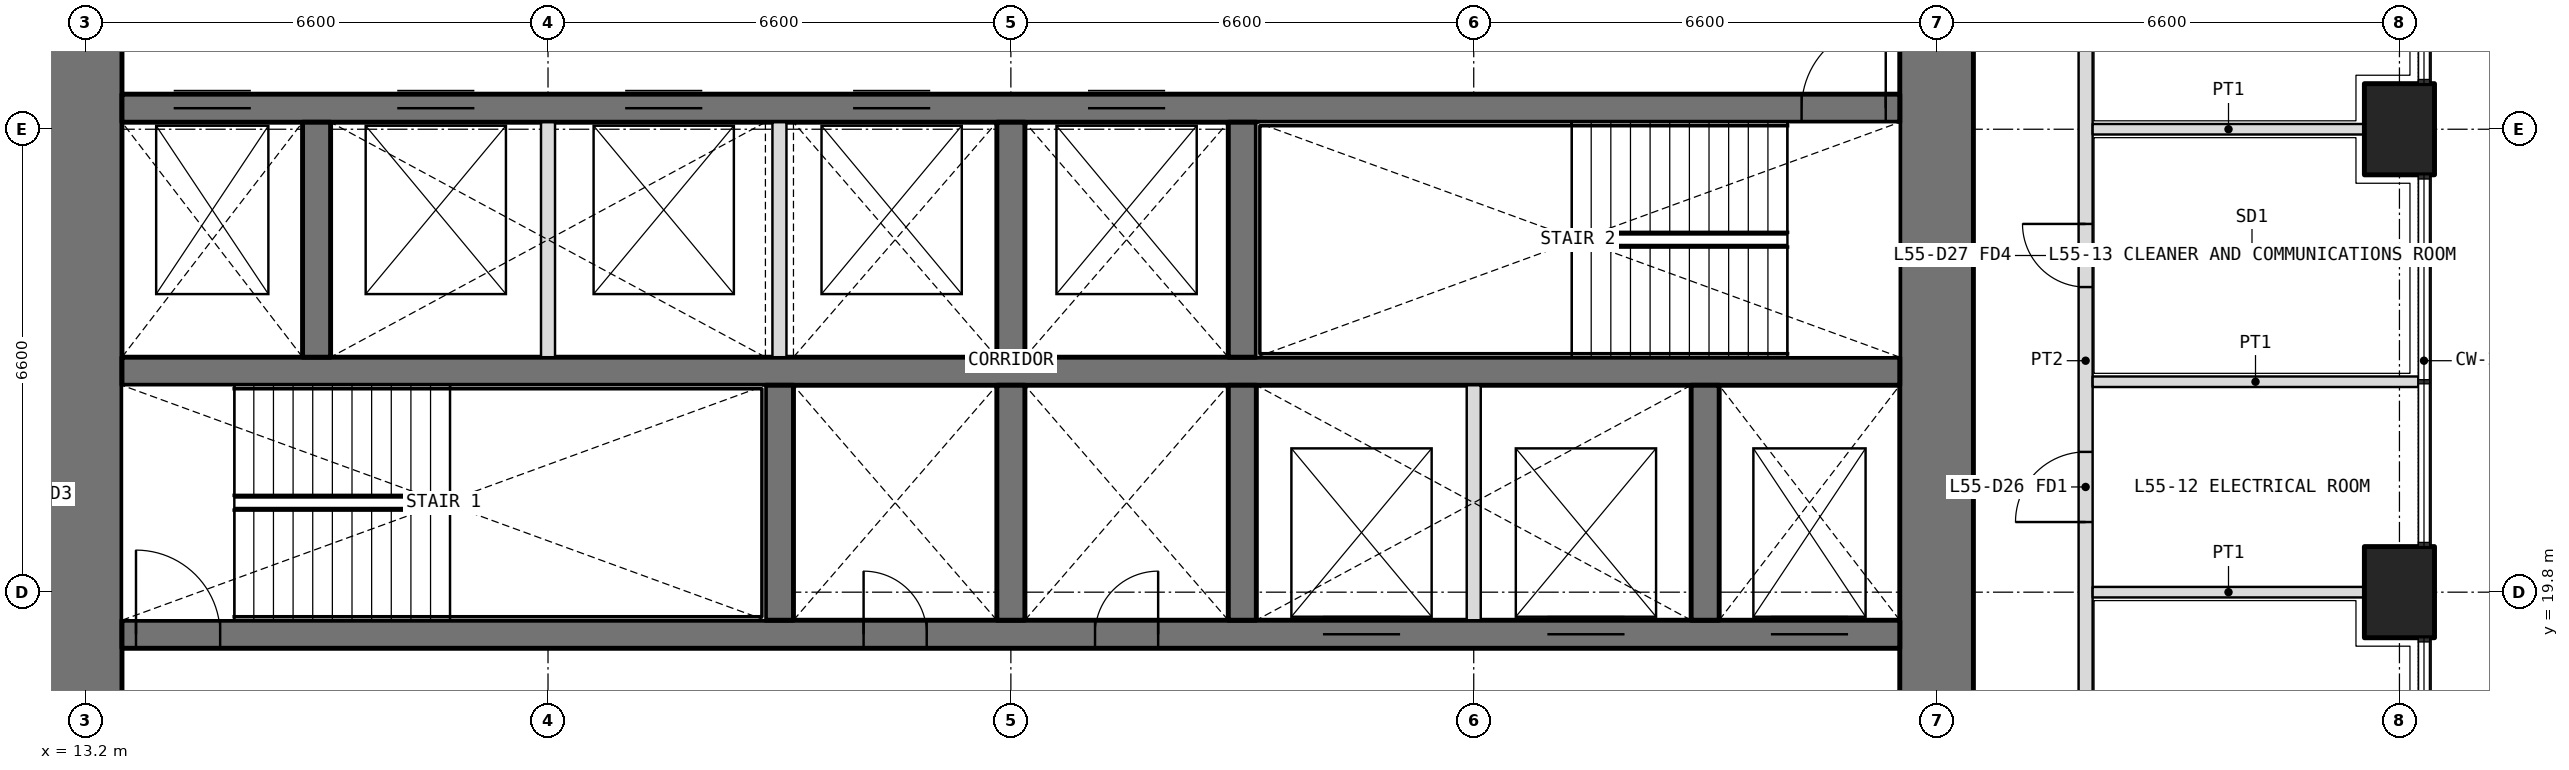
"""IFC4 building model, lengths in metres.
Left out: names, types, materials, properties, quantities, classifications, styles, units other than length and angle.
Written with IfcOpenShell. Run it as: python <this file> out.ifc"""

import sys

from ifc_helpers import new_model, si_unit, direction, frame, frame_2d, origin, origin_2d, place, context, subcontext, project, spatial, rectangle, extrude, element, fill, save


model = new_model("IFC4")
c1 = context("Model", 3, precision=1e-05, world=origin(), true_north=direction((0.0, 1.0)))
c2 = subcontext(c1, "Body", "Model", "MODEL_VIEW")
j1 = project(units=[si_unit("LENGTHUNIT", "METRE"), si_unit("PLANEANGLEUNIT", "RADIAN")], contexts=[c1])
p1 = place(None, origin())
s1 = spatial("IfcSite", under=j1, at=p1, CompositionType="ELEMENT")
p2 = place(p1, origin())
s2 = spatial("IfcBuilding", under=s1, at=p2, CompositionType="ELEMENT")
p3 = place(p2, frame((0.0, 0.0, 241.8)))
s3 = spatial("IfcBuildingStorey", under=s2, at=p3, CompositionType="ELEMENT", Elevation=241.8)
for number, where, z_axis, x_axis in (
    (1, (46.2, 19.8, 0.0), (0.0, 0.0, 1.0), (0.0, 1.0, 0.0)),
    (2, (46.2, 26.4, 0.0), (0.0, 0.0, 1.0), (0.0, 1.0, 0.0)),
):
    element("IfcColumn", number, at=place(p3, frame(where, z_axis=z_axis, x_axis=x_axis)), inside=s3, PredefinedType="COLUMN", context=c2, shape_type="SweptSolid", body=[
        extrude(rectangle(XDim=1.3, YDim=1.0, at=origin_2d()), origin(), (0.0, 0.0, 1.0), 4.2),
    ])
p4 = place(p3, frame((39.6, 13.725, 0.0), z_axis=(0.0, 0.0, 1.0), x_axis=(0.0, 1.0, 0.0)))
e3 = element("IfcWall", 3, at=p4, inside=s3, PredefinedType="SHEAR", context=c2, shape_type="SweptSolid", body=[
    extrude(rectangle(XDim=18.75, YDim=1.05, at=frame_2d((9.375, 0.0))), origin(), (0.0, 0.0, 1.0), 4.2),
])
p5 = place(p4, frame((3.025, 0.0, 0.0)))
e4 = element("IfcOpeningElement", 4, at=p5, cuts=e3, PredefinedType="OPENING", context=c2, shape_type="SweptSolid", body=[
    extrude(rectangle(XDim=1.6, YDim=2.1, at=frame_2d((0.8, 1.05))), frame((0.0, 0.535, 0.0), z_axis=(0.0, -1.0, 0.0), x_axis=(1.0, 0.0, 0.0)), (0.0, 0.0, 1.0), 1.07),
])
p6 = place(p4, frame((13.825, 0.0, 0.0)))
e5 = element("IfcOpeningElement", 5, at=p6, cuts=e3, PredefinedType="OPENING", context=c2, shape_type="SweptSolid", body=[
    extrude(rectangle(XDim=1.6, YDim=2.1, at=frame_2d((0.8, 1.05))), frame((0.0, 0.535, 0.0), z_axis=(0.0, -1.0, 0.0), x_axis=(1.0, 0.0, 0.0)), (0.0, 0.0, 1.0), 1.07),
])
p7 = place(p3, frame((13.2, 32.475, 0.0), z_axis=(0.0, 0.0, 1.0), x_axis=(0.0, -1.0, 0.0)))
e6 = element("IfcWall", 6, at=p7, inside=s3, PredefinedType="SHEAR", context=c2, shape_type="SweptSolid", body=[
    extrude(rectangle(XDim=18.75, YDim=1.05, at=frame_2d((9.375, 0.0))), origin(), (0.0, 0.0, 1.0), 4.2),
])
p8 = place(p7, frame((14.125, 0.0, 0.0)))
e7 = element("IfcOpeningElement", 7, at=p8, cuts=e6, PredefinedType="OPENING", context=c2, shape_type="SweptSolid", body=[
    extrude(rectangle(XDim=1.6, YDim=2.1, at=frame_2d((0.8, 1.05))), frame((0.0, 0.535, 0.0), z_axis=(0.0, -1.0, 0.0), x_axis=(1.0, 0.0, 0.0)), (0.0, 0.0, 1.0), 1.07),
])
p9 = place(p7, frame((3.325, 0.0, 0.0)))
e8 = element("IfcOpeningElement", 8, at=p9, cuts=e6, PredefinedType="OPENING", context=c2, shape_type="SweptSolid", body=[
    extrude(rectangle(XDim=1.6, YDim=2.1, at=frame_2d((0.8, 1.05))), frame((0.0, 0.535, 0.0), z_axis=(0.0, -1.0, 0.0), x_axis=(1.0, 0.0, 0.0)), (0.0, 0.0, 1.0), 1.07),
])
p10 = place(p3, frame((13.725, 19.2, 0.0), z_axis=(0.0, 0.0, 1.0), x_axis=(1.0, 0.0, 0.0)))
e9 = element("IfcWall", 9, at=p10, inside=s3, PredefinedType="SHEAR", context=c2, shape_type="SweptSolid", body=[
    extrude(rectangle(XDim=25.35, YDim=0.4, at=frame_2d((12.675, 0.0))), origin(), (0.0, 0.0, 1.0), 4.2),
])
p11 = place(p10, frame((10.575, 0.0, 0.0)))
e10 = element("IfcOpeningElement", 10, at=p11, cuts=e9, PredefinedType="OPENING", context=c2, shape_type="SweptSolid", body=[
    extrude(rectangle(XDim=0.9, YDim=2.1, at=frame_2d((0.45, 1.05))), frame((0.0, 0.21, 0.0), z_axis=(0.0, -1.0, 0.0), x_axis=(1.0, 0.0, 0.0)), (0.0, 0.0, 1.0), 0.42),
])
p12 = place(p10, frame((13.875, 0.0, 0.0)))
e11 = element("IfcOpeningElement", 11, at=p12, cuts=e9, PredefinedType="OPENING", context=c2, shape_type="SweptSolid", body=[
    extrude(rectangle(XDim=0.9, YDim=2.1, at=frame_2d((0.45, 1.05))), frame((0.0, 0.21, 0.0), z_axis=(0.0, -1.0, 0.0), x_axis=(1.0, 0.0, 0.0)), (0.0, 0.0, 1.0), 0.42),
])
p13 = place(p10, frame((0.2, 0.0, 0.0)))
e12 = element("IfcOpeningElement", 12, at=p13, cuts=e9, PredefinedType="OPENING", context=c2, shape_type="SweptSolid", body=[
    extrude(rectangle(XDim=1.2, YDim=2.1, at=frame_2d((0.6, 1.05))), frame((0.0, 0.21, 0.0), z_axis=(0.0, -1.0, 0.0), x_axis=(1.0, 0.0, 0.0)), (0.0, 0.0, 1.0), 0.42),
])
p14 = place(p10, frame((23.512, 0.0, 0.0)))
e13 = element("IfcOpeningElement", 13, at=p14, cuts=e9, PredefinedType="OPENING", context=c2, shape_type="SweptSolid", body=[
    extrude(rectangle(XDim=1.1, YDim=2.1, at=frame_2d((0.55, 1.05))), frame((0.0, 0.21, 0.0), z_axis=(0.0, -1.0, 0.0), x_axis=(1.0, 0.0, 0.0)), (0.0, 0.0, 1.0), 0.42),
])
p15 = place(p10, frame((17.125, 0.0, 0.0)))
e14 = element("IfcOpeningElement", 14, at=p15, cuts=e9, PredefinedType="OPENING", context=c2, shape_type="SweptSolid", body=[
    extrude(rectangle(XDim=1.1, YDim=2.1, at=frame_2d((0.55, 1.05))), frame((0.0, 0.21, 0.0), z_axis=(0.0, -1.0, 0.0), x_axis=(1.0, 0.0, 0.0)), (0.0, 0.0, 1.0), 0.42),
])
p16 = place(p10, frame((20.325, 0.0, 0.0)))
e15 = element("IfcOpeningElement", 15, at=p16, cuts=e9, PredefinedType="OPENING", context=c2, shape_type="SweptSolid", body=[
    extrude(rectangle(XDim=1.1, YDim=2.1, at=frame_2d((0.55, 1.05))), frame((0.0, 0.21, 0.0), z_axis=(0.0, -1.0, 0.0), x_axis=(1.0, 0.0, 0.0)), (0.0, 0.0, 1.0), 0.42),
])
p17 = place(p3, frame((13.725, 22.95, 0.0), z_axis=(0.0, 0.0, 1.0), x_axis=(1.0, 0.0, 0.0)))
e16 = element("IfcWall", 16, at=p17, inside=s3, PredefinedType="SHEAR", context=c2, shape_type="SweptSolid", body=[
    extrude(rectangle(XDim=25.35, YDim=0.4, at=frame_2d((12.675, 0.0))), origin(), (0.0, 0.0, 1.0), 4.2),
])
p18 = place(p3, frame((13.725, 26.7, 0.0), z_axis=(0.0, 0.0, 1.0), x_axis=(1.0, 0.0, 0.0)))
e17 = element("IfcWall", 17, at=p18, inside=s3, PredefinedType="SHEAR", context=c2, shape_type="SweptSolid", body=[
    extrude(rectangle(XDim=25.35, YDim=0.4, at=frame_2d((12.675, 0.0))), origin(), (0.0, 0.0, 1.0), 4.2),
])
p19 = place(p18, frame((23.95, 0.0, 0.0)))
e18 = element("IfcOpeningElement", 18, at=p19, cuts=e17, PredefinedType="OPENING", context=c2, shape_type="SweptSolid", body=[
    extrude(rectangle(XDim=1.2, YDim=2.1, at=frame_2d((0.6, 1.05))), frame((0.0, 0.21, 0.0), z_axis=(0.0, -1.0, 0.0), x_axis=(1.0, 0.0, 0.0)), (0.0, 0.0, 1.0), 0.42),
])
p20 = place(p18, frame((0.738, 0.0, 0.0)))
e19 = element("IfcOpeningElement", 19, at=p20, cuts=e17, PredefinedType="OPENING", context=c2, shape_type="SweptSolid", body=[
    extrude(rectangle(XDim=1.1, YDim=2.1, at=frame_2d((0.55, 1.05))), frame((0.0, 0.21, 0.0), z_axis=(0.0, -1.0, 0.0), x_axis=(1.0, 0.0, 0.0)), (0.0, 0.0, 1.0), 0.42),
])
p21 = place(p18, frame((3.925, 0.0, 0.0)))
e20 = element("IfcOpeningElement", 20, at=p21, cuts=e17, PredefinedType="OPENING", context=c2, shape_type="SweptSolid", body=[
    extrude(rectangle(XDim=1.1, YDim=2.1, at=frame_2d((0.55, 1.05))), frame((0.0, 0.21, 0.0), z_axis=(0.0, -1.0, 0.0), x_axis=(1.0, 0.0, 0.0)), (0.0, 0.0, 1.0), 0.42),
])
p22 = place(p18, frame((7.175, 0.0, 0.0)))
e21 = element("IfcOpeningElement", 21, at=p22, cuts=e17, PredefinedType="OPENING", context=c2, shape_type="SweptSolid", body=[
    extrude(rectangle(XDim=1.1, YDim=2.1, at=frame_2d((0.55, 1.05))), frame((0.0, 0.21, 0.0), z_axis=(0.0, -1.0, 0.0), x_axis=(1.0, 0.0, 0.0)), (0.0, 0.0, 1.0), 0.42),
])
p23 = place(p18, frame((10.425, 0.0, 0.0)))
e22 = element("IfcOpeningElement", 22, at=p23, cuts=e17, PredefinedType="OPENING", context=c2, shape_type="SweptSolid", body=[
    extrude(rectangle(XDim=1.1, YDim=2.1, at=frame_2d((0.55, 1.05))), frame((0.0, 0.21, 0.0), z_axis=(0.0, -1.0, 0.0), x_axis=(1.0, 0.0, 0.0)), (0.0, 0.0, 1.0), 0.42),
])
p24 = place(p18, frame((13.775, 0.0, 0.0)))
e23 = element("IfcOpeningElement", 23, at=p24, cuts=e17, PredefinedType="OPENING", context=c2, shape_type="SweptSolid", body=[
    extrude(rectangle(XDim=1.1, YDim=2.1, at=frame_2d((0.55, 1.05))), frame((0.0, 0.21, 0.0), z_axis=(0.0, -1.0, 0.0), x_axis=(1.0, 0.0, 0.0)), (0.0, 0.0, 1.0), 0.42),
])
for number, where, z_axis, x_axis in (
    (24, (23.1, 19.4, 0.0), (0.0, 0.0, 1.0), (0.0, 1.0, 0.0)),
    (25, (26.4, 19.4, 0.0), (0.0, 0.0, 1.0), (0.0, 1.0, 0.0)),
    (26, (29.7, 19.4, 0.0), (0.0, 0.0, 1.0), (0.0, 1.0, 0.0)),
    (27, (36.3, 19.4, 0.0), (0.0, 0.0, 1.0), (0.0, 1.0, 0.0)),
    (28, (16.5, 23.15, 0.0), (0.0, 0.0, 1.0), (0.0, 1.0, 0.0)),
    (29, (26.4, 23.15, 0.0), (0.0, 0.0, 1.0), (0.0, 1.0, 0.0)),
    (30, (29.7, 23.15, 0.0), (0.0, 0.0, 1.0), (0.0, 1.0, 0.0)),
):
    element("IfcWall", number, at=place(p3, frame(where, z_axis=z_axis, x_axis=x_axis)), inside=s3, PredefinedType="SHEAR", context=c2, shape_type="SweptSolid", body=[
        extrude(rectangle(XDim=3.35, YDim=0.4, at=frame_2d((1.675, 0.0))), origin(), (0.0, 0.0, 1.0), 4.2),
    ])
for number, where, z_axis, x_axis in (
    (31, (33.0, 19.4, 0.0), (0.0, 0.0, 1.0), (0.0, 1.0, 0.0)),
    (32, (19.8, 23.15, 0.0), (0.0, 0.0, 1.0), (0.0, 1.0, 0.0)),
    (33, (23.1, 23.15, 0.0), (0.0, 0.0, 1.0), (0.0, 1.0, 0.0)),
):
    element("IfcWall", number, at=place(p3, frame(where, z_axis=z_axis, x_axis=x_axis)), inside=s3, PredefinedType="PARTITIONING", context=c2, shape_type="SweptSolid", body=[
        extrude(rectangle(XDim=3.35, YDim=0.2, at=frame_2d((1.675, 0.0))), origin(), (0.0, 0.0, 1.0), 4.2),
    ])
p25 = place(p3, frame((41.725, 7.4, 0.0), z_axis=(0.0, 0.0, 1.0), x_axis=(0.0, 1.0, 0.0)))
e34 = element("IfcWall", 34, at=p25, inside=s3, PredefinedType="PARTITIONING", context=c2, shape_type="SweptSolid", body=[
    extrude(rectangle(XDim=31.4, YDim=0.2, at=frame_2d((15.7, 0.0))), origin(), (0.0, 0.0, 1.0), 3.0),
])
p26 = place(p25, frame((5.65, 0.0, 0.0)))
e35 = element("IfcOpeningElement", 35, at=p26, cuts=e34, PredefinedType="OPENING", context=c2, shape_type="SweptSolid", body=[
    extrude(rectangle(XDim=1.0, YDim=2.1, at=frame_2d((0.5, 1.05))), frame((0.0, 0.11, 0.0), z_axis=(0.0, -1.0, 0.0), x_axis=(1.0, 0.0, 0.0)), (0.0, 0.0, 1.0), 0.22),
])
p27 = place(p25, frame((13.4, 0.0, 0.0)))
e36 = element("IfcOpeningElement", 36, at=p27, cuts=e34, PredefinedType="OPENING", context=c2, shape_type="SweptSolid", body=[
    extrude(rectangle(XDim=1.0, YDim=2.1, at=frame_2d((0.5, 1.05))), frame((0.0, 0.11, 0.0), z_axis=(0.0, -1.0, 0.0), x_axis=(1.0, 0.0, 0.0)), (0.0, 0.0, 1.0), 0.22),
])
p28 = place(p25, frame((16.75, 0.0, 0.0)))
e37 = element("IfcOpeningElement", 37, at=p28, cuts=e34, PredefinedType="OPENING", context=c2, shape_type="SweptSolid", body=[
    extrude(rectangle(XDim=0.9, YDim=2.1, at=frame_2d((0.45, 1.05))), frame((0.0, 0.11, 0.0), z_axis=(0.0, -1.0, 0.0), x_axis=(1.0, 0.0, 0.0)), (0.0, 0.0, 1.0), 0.22),
])
p29 = place(p25, frame((21.8, 0.0, 0.0)))
e38 = element("IfcOpeningElement", 38, at=p29, cuts=e34, PredefinedType="OPENING", context=c2, shape_type="SweptSolid", body=[
    extrude(rectangle(XDim=1.0, YDim=2.1, at=frame_2d((0.5, 1.05))), frame((0.0, 0.11, 0.0), z_axis=(0.0, -1.0, 0.0), x_axis=(1.0, 0.0, 0.0)), (0.0, 0.0, 1.0), 0.22),
])
p30 = place(p25, frame((28.05, 0.0, 0.0)))
e39 = element("IfcOpeningElement", 39, at=p30, cuts=e34, PredefinedType="OPENING", context=c2, shape_type="SweptSolid", body=[
    extrude(rectangle(XDim=1.0, YDim=2.1, at=frame_2d((0.5, 1.05))), frame((0.0, 0.11, 0.0), z_axis=(0.0, -1.0, 0.0), x_axis=(1.0, 0.0, 0.0)), (0.0, 0.0, 1.0), 0.22),
])
p31 = place(p3, frame((46.47, 22.8, 0.0), z_axis=(0.0, 0.0, 1.0), x_axis=(-1.0, 0.0, 0.0)))
e40 = element("IfcWall", 40, at=p31, inside=s3, PredefinedType="PARTITIONING", context=c2, shape_type="SweptSolid", body=[
    extrude(rectangle(XDim=4.645, YDim=0.15, at=frame_2d((2.323, 0.0))), origin(), (0.0, 0.0, 1.0), 2.7),
])
for number, where, z_axis, x_axis in (
    (41, (45.7, 26.4, 0.0), (0.0, 0.0, 1.0), (-1.0, 0.0, 0.0)),
    (42, (45.7, 19.8, 0.0), (0.0, 0.0, 1.0), (-1.0, 0.0, 0.0)),
):
    element("IfcWall", number, at=place(p3, frame(where, z_axis=z_axis, x_axis=x_axis)), inside=s3, PredefinedType="PARTITIONING", context=c2, shape_type="SweptSolid", body=[
        extrude(rectangle(XDim=3.875, YDim=0.15, at=frame_2d((1.938, 0.0))), origin(), (0.0, 0.0, 1.0), 3.0),
    ])
p32 = place(p27, origin())
e43 = element("IfcDoor", 43, at=p32, inside=s3, OperationType="SINGLE_SWING_LEFT", PredefinedType="DOOR", context=c2, shape_type="SweptSolid", body=[
    extrude(rectangle(XDim=1.0, YDim=2.1, at=frame_2d((0.5, 1.05))), frame((0.0, 0.025, 0.0), z_axis=(0.0, -1.0, 0.0), x_axis=(1.0, 0.0, 0.0)), (0.0, 0.0, 1.0), 0.05),
])
fill(e36, e43)
p33 = place(p28, origin())
e44 = element("IfcDoor", 44, at=p33, inside=s3, OperationType="SINGLE_SWING_RIGHT", PredefinedType="DOOR", context=c2, shape_type="SweptSolid", body=[
    extrude(rectangle(XDim=0.9, YDim=2.1, at=frame_2d((0.45, 1.05))), frame((0.0, 0.025, 0.0), z_axis=(0.0, -1.0, 0.0), x_axis=(1.0, 0.0, 0.0)), (0.0, 0.0, 1.0), 0.05),
])
fill(e37, e44)
p34 = place(p11, origin())
e45 = element("IfcDoor", 45, at=p34, inside=s3, OperationType="SINGLE_SWING_LEFT", PredefinedType="DOOR", context=c2, shape_type="SweptSolid", body=[
    extrude(rectangle(XDim=0.9, YDim=2.1, at=frame_2d((0.45, 1.05))), frame((0.0, 0.025, 0.0), z_axis=(0.0, -1.0, 0.0), x_axis=(1.0, 0.0, 0.0)), (0.0, 0.0, 1.0), 0.05),
])
fill(e10, e45)
p35 = place(p12, origin())
e46 = element("IfcDoor", 46, at=p35, inside=s3, OperationType="SINGLE_SWING_RIGHT", PredefinedType="DOOR", context=c2, shape_type="SweptSolid", body=[
    extrude(rectangle(XDim=0.9, YDim=2.1, at=frame_2d((0.45, 1.05))), frame((0.0, 0.025, 0.0), z_axis=(0.0, -1.0, 0.0), x_axis=(1.0, 0.0, 0.0)), (0.0, 0.0, 1.0), 0.05),
])
fill(e11, e46)
p36 = place(p13, origin())
e47 = element("IfcDoor", 47, at=p36, inside=s3, OperationType="SINGLE_SWING_LEFT", PredefinedType="DOOR", context=c2, shape_type="SweptSolid", body=[
    extrude(rectangle(XDim=1.2, YDim=2.1, at=frame_2d((0.6, 1.05))), frame((0.0, 0.025, 0.0), z_axis=(0.0, -1.0, 0.0), x_axis=(1.0, 0.0, 0.0)), (0.0, 0.0, 1.0), 0.05),
])
fill(e12, e47)
p37 = place(p19, origin())
e48 = element("IfcDoor", 48, at=p37, inside=s3, OperationType="SINGLE_SWING_RIGHT", PredefinedType="DOOR", context=c2, shape_type="SweptSolid", body=[
    extrude(rectangle(XDim=1.2, YDim=2.1, at=frame_2d((0.6, 1.05))), frame((0.0, 0.025, 0.0), z_axis=(0.0, -1.0, 0.0), x_axis=(1.0, 0.0, 0.0)), (0.0, 0.0, 1.0), 0.05),
])
fill(e18, e48)
p38 = place(p20, origin())
e49 = element("IfcDoor", 49, at=p38, inside=s3, OperationType="DOUBLE_DOOR_SLIDING", PredefinedType="DOOR", context=c2, shape_type="SweptSolid", body=[
    extrude(rectangle(XDim=1.1, YDim=2.1, at=frame_2d((0.55, 1.05))), frame((0.0, 0.025, 0.0), z_axis=(0.0, -1.0, 0.0), x_axis=(1.0, 0.0, 0.0)), (0.0, 0.0, 1.0), 0.05),
])
fill(e19, e49)
p39 = place(p14, origin())
e50 = element("IfcDoor", 50, at=p39, inside=s3, OperationType="DOUBLE_DOOR_SLIDING", PredefinedType="DOOR", context=c2, shape_type="SweptSolid", body=[
    extrude(rectangle(XDim=1.1, YDim=2.1, at=frame_2d((0.55, 1.05))), frame((0.0, 0.025, 0.0), z_axis=(0.0, -1.0, 0.0), x_axis=(1.0, 0.0, 0.0)), (0.0, 0.0, 1.0), 0.05),
])
fill(e13, e50)
p40 = place(p15, origin())
e51 = element("IfcDoor", 51, at=p40, inside=s3, OperationType="DOUBLE_DOOR_SLIDING", PredefinedType="DOOR", context=c2, shape_type="SweptSolid", body=[
    extrude(rectangle(XDim=1.1, YDim=2.1, at=frame_2d((0.55, 1.05))), frame((0.0, 0.025, 0.0), z_axis=(0.0, -1.0, 0.0), x_axis=(1.0, 0.0, 0.0)), (0.0, 0.0, 1.0), 0.05),
])
fill(e14, e51)
p41 = place(p16, origin())
e52 = element("IfcDoor", 52, at=p41, inside=s3, OperationType="DOUBLE_DOOR_SLIDING", PredefinedType="DOOR", context=c2, shape_type="SweptSolid", body=[
    extrude(rectangle(XDim=1.1, YDim=2.1, at=frame_2d((0.55, 1.05))), frame((0.0, 0.025, 0.0), z_axis=(0.0, -1.0, 0.0), x_axis=(1.0, 0.0, 0.0)), (0.0, 0.0, 1.0), 0.05),
])
fill(e15, e52)
p42 = place(p21, origin())
e53 = element("IfcDoor", 53, at=p42, inside=s3, OperationType="DOUBLE_DOOR_SLIDING", PredefinedType="DOOR", context=c2, shape_type="SweptSolid", body=[
    extrude(rectangle(XDim=1.1, YDim=2.1, at=frame_2d((0.55, 1.05))), frame((0.0, 0.025, 0.0), z_axis=(0.0, -1.0, 0.0), x_axis=(1.0, 0.0, 0.0)), (0.0, 0.0, 1.0), 0.05),
])
fill(e20, e53)
p43 = place(p22, origin())
e54 = element("IfcDoor", 54, at=p43, inside=s3, OperationType="DOUBLE_DOOR_SLIDING", PredefinedType="DOOR", context=c2, shape_type="SweptSolid", body=[
    extrude(rectangle(XDim=1.1, YDim=2.1, at=frame_2d((0.55, 1.05))), frame((0.0, 0.025, 0.0), z_axis=(0.0, -1.0, 0.0), x_axis=(1.0, 0.0, 0.0)), (0.0, 0.0, 1.0), 0.05),
])
fill(e21, e54)
p44 = place(p23, origin())
e55 = element("IfcDoor", 55, at=p44, inside=s3, OperationType="DOUBLE_DOOR_SLIDING", PredefinedType="DOOR", context=c2, shape_type="SweptSolid", body=[
    extrude(rectangle(XDim=1.1, YDim=2.1, at=frame_2d((0.55, 1.05))), frame((0.0, 0.025, 0.0), z_axis=(0.0, -1.0, 0.0), x_axis=(1.0, 0.0, 0.0)), (0.0, 0.0, 1.0), 0.05),
])
fill(e22, e55)
p45 = place(p24, origin())
e56 = element("IfcDoor", 56, at=p45, inside=s3, OperationType="DOUBLE_DOOR_SLIDING", PredefinedType="DOOR", context=c2, shape_type="SweptSolid", body=[
    extrude(rectangle(XDim=1.1, YDim=2.1, at=frame_2d((0.55, 1.05))), frame((0.0, 0.025, 0.0), z_axis=(0.0, -1.0, 0.0), x_axis=(1.0, 0.0, 0.0)), (0.0, 0.0, 1.0), 0.05),
])
fill(e23, e56)
save(model, sys.argv[1])
